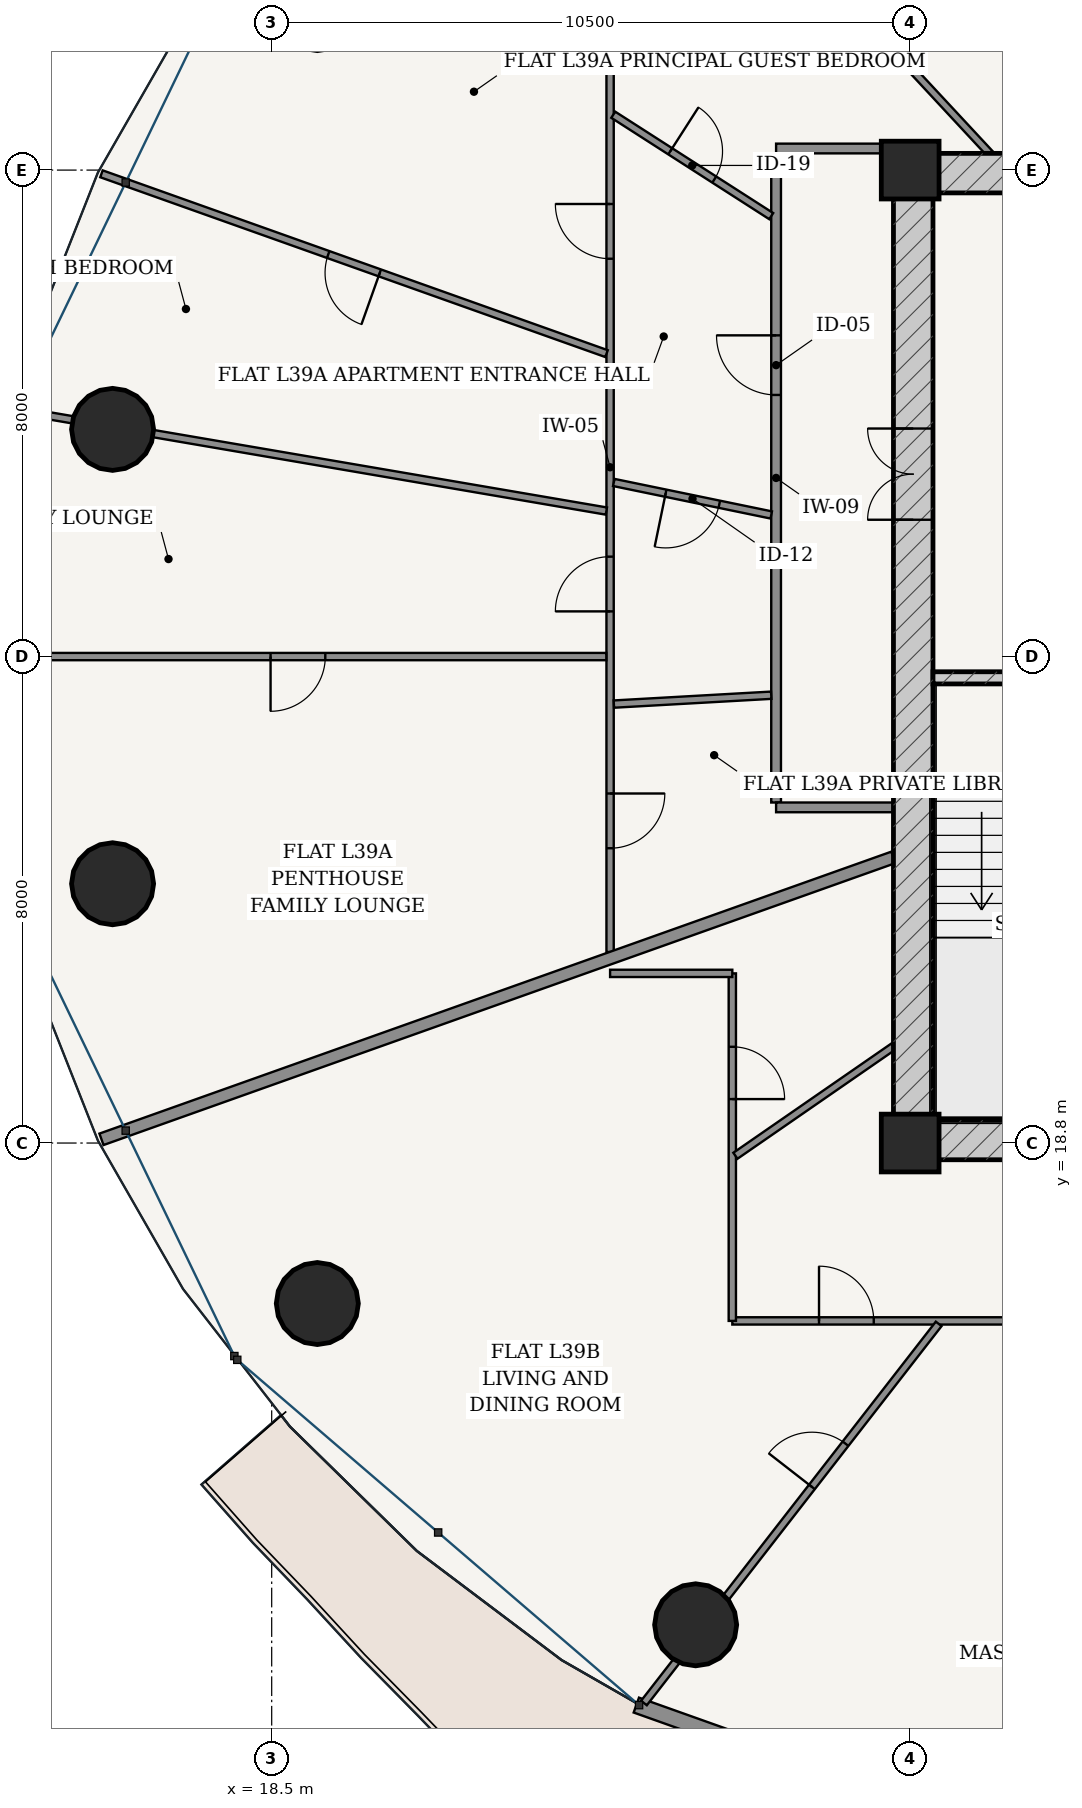
"""IFC4 building model, lengths in metres.
Left out: names, types, materials, properties, quantities, classifications, styles, units other than length and angle.
Written with IfcOpenShell. Run it as: python <this file> out.ifc"""

import sys

from ifc_helpers import new_model, si_unit, direction, frame, frame_2d, origin, origin_2d, place, context, subcontext, project, spatial, rectangle, hollow_circle, extrude, source, transform, mapped, element, fill, save


model = new_model("IFC4")
c1 = context("Model", 3, precision=1e-05, world=origin(), true_north=direction((-0.2419218956, 0.970295726276)))
c2 = subcontext(c1, "Body", "Model", "MODEL_VIEW")
j1 = project(units=[si_unit("LENGTHUNIT", "METRE"), si_unit("PLANEANGLEUNIT", "RADIAN")], contexts=[c1])
p1 = place(None, origin())
s1 = spatial("IfcSite", under=j1, at=p1, CompositionType="ELEMENT")
p2 = place(p1, origin())
s2 = spatial("IfcBuilding", under=s1, at=p2, CompositionType="ELEMENT")
p3 = place(p2, frame((0.0, 0.0, 149.8)))
s3 = spatial("IfcBuildingStorey", under=s2, at=p3, CompositionType="ELEMENT", Elevation=149.8)
for number, where, z_axis, x_axis in (
    (1, (29.0, 18.8, 0.0), (0.0, 0.0, 1.0), (1.0, 0.0, 0.0)),
    (2, (29.0, 34.8, 0.0), (0.0, 0.0, 1.0), (1.0, 0.0, 0.0)),
):
    element("IfcColumn", number, at=place(p3, frame(where, z_axis=z_axis, x_axis=x_axis)), inside=s3, PredefinedType="COLUMN", context=c2, shape_type="SweptSolid", body=[
        extrude(rectangle(XDim=0.95, YDim=0.95, at=origin_2d()), origin(), (0.0, 0.0, 1.0), 3.6),
    ])
p4 = place(p3, frame((28.725, 18.85, 0.0), z_axis=(0.0, 0.0, 1.0), x_axis=(1.0, 0.0, 0.0)))
e3 = element("IfcWall", 3, at=p4, inside=s3, PredefinedType="SHEAR", context=c2, shape_type="SweptSolid", body=[
    extrude(rectangle(XDim=18.55, YDim=0.65, at=frame_2d((9.275, 0.0))), origin(), (0.0, 0.0, 1.0), 3.33),
])
p5 = place(p4, frame((7.51, 0.0, 0.0)))
e4 = element("IfcOpeningElement", 4, at=p5, cuts=e3, PredefinedType="OPENING", context=c2, shape_type="SweptSolid", body=[
    extrude(rectangle(XDim=0.85, YDim=2.1, at=frame_2d((0.425, 1.05))), frame((0.0, 0.335, 0.0), z_axis=(0.0, -1.0, 0.0), x_axis=(1.0, 0.0, 0.0)), (0.0, 0.0, 1.0), 0.67),
])
p6 = place(p4, frame((10.59, 0.0, 0.0)))
e5 = element("IfcOpeningElement", 5, at=p6, cuts=e3, PredefinedType="OPENING", context=c2, shape_type="SweptSolid", body=[
    extrude(rectangle(XDim=0.85, YDim=2.1, at=frame_2d((0.425, 1.05))), frame((0.0, 0.335, 0.0), z_axis=(0.0, -1.0, 0.0), x_axis=(1.0, 0.0, 0.0)), (0.0, 0.0, 1.0), 0.67),
])
p7 = place(p3, frame((28.725, 34.75, 0.0), z_axis=(0.0, 0.0, 1.0), x_axis=(1.0, 0.0, 0.0)))
e6 = element("IfcWall", 6, at=p7, inside=s3, PredefinedType="SHEAR", context=c2, shape_type="SweptSolid", body=[
    extrude(rectangle(XDim=18.55, YDim=0.65, at=frame_2d((9.275, 0.0))), origin(), (0.0, 0.0, 1.0), 3.33),
])
p8 = place(p3, frame((29.05, 19.175, 0.0), z_axis=(0.0, 0.0, 1.0), x_axis=(0.0, 1.0, 0.0)))
e7 = element("IfcWall", 7, at=p8, inside=s3, PredefinedType="SHEAR", context=c2, shape_type="SweptSolid", body=[
    extrude(rectangle(XDim=15.25, YDim=0.65, at=frame_2d((7.625, 0.0))), origin(), (0.0, 0.0, 1.0), 3.33),
])
p9 = place(p8, frame((9.875, 0.0, 0.0)))
e8 = element("IfcOpeningElement", 8, at=p9, cuts=e7, PredefinedType="OPENING", context=c2, shape_type="SweptSolid", body=[
    extrude(rectangle(XDim=1.5, YDim=2.2, at=frame_2d((0.75, 1.1))), frame((0.0, 0.335, 0.0), z_axis=(0.0, -1.0, 0.0), x_axis=(1.0, 0.0, 0.0)), (0.0, 0.0, 1.0), 0.67),
])
p10 = place(p3, frame((29.375, 26.45, 0.0), z_axis=(0.0, 0.0, 1.0), x_axis=(1.0, 0.0, 0.0)))
e9 = element("IfcWall", 9, at=p10, inside=s3, PredefinedType="SOLIDWALL", context=c2, shape_type="SweptSolid", body=[
    extrude(rectangle(XDim=3.32, YDim=0.2, at=frame_2d((1.66, 0.0))), origin(), (0.0, 0.0, 1.0), 3.33),
])
p11 = place(p10, frame((1.185, 0.0, 0.0)))
e10 = element("IfcOpeningElement", 10, at=p11, cuts=e9, PredefinedType="OPENING", context=c2, shape_type="SweptSolid", body=[
    extrude(rectangle(XDim=0.95, YDim=2.15, at=frame_2d((0.475, 1.075))), frame((0.0, 0.11, 0.0), z_axis=(0.0, -1.0, 0.0), x_axis=(1.0, 0.0, 0.0)), (0.0, 0.0, 1.0), 0.22),
])
for number, where, z_axis, x_axis in (
    (11, (15.883, 30.536, 0.0), (0.0, 0.0, 1.0), (1.0, 0.0, 0.0)),
    (12, (15.883, 23.064, 0.0), (0.0, 0.0, 1.0), (1.0, 0.0, 0.0)),
    (13, (19.25, 16.161, 0.0), (0.0, 0.0, 1.0), (1.0, 0.0, 0.0)),
    (14, (25.472, 10.877, 0.0), (0.0, 0.0, 1.0), (1.0, 0.0, 0.0)),
):
    element("IfcColumn", number, at=place(p3, frame(where, z_axis=z_axis, x_axis=x_axis)), inside=s3, PredefinedType="COLUMN", context=c2, shape_type="SweptSolid", body=[
        extrude(hollow_circle(Radius=0.675, WallThickness=0.042, at=origin_2d()), origin(), (0.0, 0.0, 1.0), 3.6),
    ])
p12 = place(p3, frame((24.497, 9.557, 0.0), z_axis=(0.0, 0.0, 1.0), x_axis=(0.942103604331, -0.335321932934, 0.0)))
e15 = element("IfcWall", 15, at=p12, inside=s3, PredefinedType="SOLIDWALL", context=c2, shape_type="SweptSolid", body=[
    extrude(rectangle(XDim=9.408, YDim=0.26, at=frame_2d((4.704, 0.0))), origin(), (0.0, 0.0, 1.0), 3.33),
])
p13 = place(p12, frame((4.029, 0.0, 0.0)))
e16 = element("IfcOpeningElement", 16, at=p13, cuts=e15, PredefinedType="OPENING", context=c2, shape_type="SweptSolid", body=[
    extrude(rectangle(XDim=1.35, YDim=2.2, at=frame_2d((0.675, 1.1))), frame((0.0, 0.14, 0.0), z_axis=(0.0, -1.0, 0.0), x_axis=(1.0, 0.0, 0.0)), (0.0, 0.0, 1.0), 0.28),
])
p14 = place(p3, frame((26.795, 24.4, 0.0), z_axis=(0.0, 0.0, 1.0), x_axis=(0.0, 1.0, 0.0)))
e17 = element("IfcWall", 17, at=p14, inside=s3, PredefinedType="PARTITIONING", context=c2, shape_type="SweptSolid", body=[
    extrude(rectangle(XDim=10.675, YDim=0.16, at=frame_2d((5.337, 0.0))), origin(), (0.0, 0.0, 1.0), 2.776),
])
p15 = place(p14, frame((6.702, 0.0, 0.0)))
e18 = element("IfcOpeningElement", 18, at=p15, cuts=e17, PredefinedType="OPENING", context=c2, shape_type="SweptSolid", body=[
    extrude(rectangle(XDim=0.98, YDim=2.2, at=frame_2d((0.49, 1.1))), frame((0.0, 0.09, 0.0), z_axis=(0.0, -1.0, 0.0), x_axis=(1.0, 0.0, 0.0)), (0.0, 0.0, 1.0), 0.18),
])
p16 = place(p3, frame((26.795, 35.155, 0.0), z_axis=(0.0, 0.0, 1.0), x_axis=(1.0, 0.0, 0.0)))
e19 = element("IfcWall", 19, at=p16, inside=s3, PredefinedType="PARTITIONING", context=c2, shape_type="SweptSolid", body=[
    extrude(rectangle(XDim=1.93, YDim=0.16, at=frame_2d((0.965, 0.0))), origin(), (0.0, 0.0, 1.0), 2.776),
])
p17 = place(p3, frame((26.795, 24.32, 0.0), z_axis=(0.0, 0.0, 1.0), x_axis=(1.0, 0.0, 0.0)))
e20 = element("IfcWall", 20, at=p17, inside=s3, PredefinedType="PARTITIONING", context=c2, shape_type="SweptSolid", body=[
    extrude(rectangle(XDim=1.93, YDim=0.16, at=frame_2d((0.965, 0.0))), origin(), (0.0, 0.0, 1.0), 3.33),
])
p18 = place(p3, frame((24.065, 21.941, 0.0), z_axis=(0.0, 0.0, 1.0), x_axis=(0.0, 1.0, 0.0)))
e21 = element("IfcWall", 21, at=p18, inside=s3, PredefinedType="PARTITIONING", context=c2, shape_type="SweptSolid", body=[
    extrude(rectangle(XDim=15.944, YDim=0.12, at=frame_2d((7.972, 0.0))), origin(), (0.0, 0.0, 1.0), 2.776),
])
p19 = place(p18, frame((5.602, 0.0, 0.0)))
e22 = element("IfcOpeningElement", 22, at=p19, cuts=e21, PredefinedType="OPENING", context=c2, shape_type="SweptSolid", body=[
    extrude(rectangle(XDim=0.9, YDim=2.15, at=frame_2d((0.45, 1.075))), frame((0.0, 0.07, 0.0), z_axis=(0.0, -1.0, 0.0), x_axis=(1.0, 0.0, 0.0)), (0.0, 0.0, 1.0), 0.14),
])
p20 = place(p18, frame((1.707, 0.0, 0.0)))
e23 = element("IfcOpeningElement", 23, at=p20, cuts=e21, PredefinedType="OPENING", context=c2, shape_type="SweptSolid", body=[
    extrude(rectangle(XDim=0.9, YDim=2.15, at=frame_2d((0.45, 1.075))), frame((0.0, 0.07, 0.0), z_axis=(0.0, -1.0, 0.0), x_axis=(1.0, 0.0, 0.0)), (0.0, 0.0, 1.0), 0.14),
])
p21 = place(p18, frame((11.402, 0.0, 0.0)))
e24 = element("IfcOpeningElement", 24, at=p21, cuts=e21, PredefinedType="OPENING", context=c2, shape_type="SweptSolid", body=[
    extrude(rectangle(XDim=0.9, YDim=2.15, at=frame_2d((0.45, 1.075))), frame((0.0, 0.07, 0.0), z_axis=(0.0, -1.0, 0.0), x_axis=(1.0, 0.0, 0.0)), (0.0, 0.0, 1.0), 0.14),
])
p22 = place(p3, frame((24.007, 31.782, 0.0), z_axis=(0.0, 0.0, 1.0), x_axis=(-0.942077868165, 0.335394231187, 0.0)))
e25 = element("IfcWall", 25, at=p22, inside=s3, PredefinedType="PARTITIONING", context=c2, shape_type="SweptSolid", body=[
    extrude(rectangle(XDim=8.817, YDim=0.12, at=frame_2d((4.408, 0.0))), origin(), (0.0, 0.0, 1.0), 2.846),
])
p23 = place(p22, frame((3.958, 0.0, 0.0)))
e26 = element("IfcOpeningElement", 26, at=p23, cuts=e25, PredefinedType="OPENING", context=c2, shape_type="SweptSolid", body=[
    extrude(rectangle(XDim=0.9, YDim=2.15, at=frame_2d((0.45, 1.075))), frame((0.0, 0.07, 0.0), z_axis=(0.0, -1.0, 0.0), x_axis=(1.0, 0.0, 0.0)), (0.0, 0.0, 1.0), 0.14),
])
p24 = place(p3, frame((24.004, 29.193, 0.0), z_axis=(0.0, 0.0, 1.0), x_axis=(-0.985698378271, 0.168519159369, 0.0)))
e27 = element("IfcWall", 27, at=p24, inside=s3, PredefinedType="PARTITIONING", context=c2, shape_type="SweptSolid", body=[
    extrude(rectangle(XDim=9.769, YDim=0.12, at=frame_2d((4.884, 0.0))), origin(), (0.0, 0.0, 1.0), 2.776),
])
p25 = place(p3, frame((24.003, 26.8, 0.0), z_axis=(0.0, 0.0, 1.0), x_axis=(-1.0, 0.0, 0.0)))
e28 = element("IfcWall", 28, at=p25, inside=s3, PredefinedType="PARTITIONING", context=c2, shape_type="SweptSolid", body=[
    extrude(rectangle(XDim=10.143, YDim=0.12, at=frame_2d((5.071, 0.0))), origin(), (0.0, 0.0, 1.0), 2.846),
])
p26 = place(p25, frame((4.622, 0.0, 0.0)))
e29 = element("IfcOpeningElement", 29, at=p26, cuts=e28, PredefinedType="OPENING", context=c2, shape_type="SweptSolid", body=[
    extrude(rectangle(XDim=0.9, YDim=2.15, at=frame_2d((0.45, 1.075))), frame((0.0, 0.07, 0.0), z_axis=(0.0, -1.0, 0.0), x_axis=(1.0, 0.0, 0.0)), (0.0, 0.0, 1.0), 0.14),
])
p27 = place(p3, frame((30.307, 35.075, 0.0), z_axis=(0.0, 0.0, 1.0), x_axis=(-0.68082810609, 0.732443233267, 0.0)))
e30 = element("IfcWall", 30, at=p27, inside=s3, PredefinedType="PARTITIONING", context=c2, shape_type="SweptSolid", body=[
    extrude(rectangle(XDim=3.775, YDim=0.12, at=frame_2d((1.887, 0.0))), origin(), (0.0, 0.0, 1.0), 2.776),
])
p28 = place(p3, frame((26.715, 34.043, 0.0), z_axis=(0.0, 0.0, 1.0), x_axis=(-0.841597086151, 0.540105864235, 0.0)))
e31 = element("IfcWall", 31, at=p28, inside=s3, PredefinedType="PARTITIONING", context=c2, shape_type="SweptSolid", body=[
    extrude(rectangle(XDim=3.087, YDim=0.12, at=frame_2d((1.543, 0.0))), origin(), (0.0, 0.0, 1.0), 3.005),
])
p29 = place(p28, frame((1.113, 0.0, 0.0)))
e32 = element("IfcOpeningElement", 32, at=p29, cuts=e31, PredefinedType="OPENING", context=c2, shape_type="SweptSolid", body=[
    extrude(rectangle(XDim=0.86, YDim=2.15, at=frame_2d((0.43, 1.075))), frame((0.0, 0.07, 0.0), z_axis=(0.0, -1.0, 0.0), x_axis=(1.0, 0.0, 0.0)), (0.0, 0.0, 1.0), 0.14),
])
p30 = place(p3, frame((26.715, 29.129, 0.0), z_axis=(0.0, 0.0, 1.0), x_axis=(-0.979376501526, 0.202043728582, 0.0)))
e33 = element("IfcWall", 33, at=p30, inside=s3, PredefinedType="PARTITIONING", context=c2, shape_type="SweptSolid", body=[
    extrude(rectangle(XDim=2.644, YDim=0.12, at=frame_2d((1.322, 0.0))), origin(), (0.0, 0.0, 1.0), 3.33),
])
p31 = place(p30, frame((0.872, 0.0, 0.0)))
e34 = element("IfcOpeningElement", 34, at=p31, cuts=e33, PredefinedType="OPENING", context=c2, shape_type="SweptSolid", body=[
    extrude(rectangle(XDim=0.9, YDim=2.15, at=frame_2d((0.45, 1.075))), frame((0.0, 0.07, 0.0), z_axis=(0.0, -1.0, 0.0), x_axis=(1.0, 0.0, 0.0)), (0.0, 0.0, 1.0), 0.14),
])
p32 = place(p3, frame((26.715, 26.164, 0.0), z_axis=(0.0, 0.0, 1.0), x_axis=(-0.998418047295, -0.056226353574, 0.0)))
e35 = element("IfcWall", 35, at=p32, inside=s3, PredefinedType="PARTITIONING", context=c2, shape_type="SweptSolid", body=[
    extrude(rectangle(XDim=2.592, YDim=0.12, at=frame_2d((1.296, 0.0))), origin(), (0.0, 0.0, 1.0), 3.33),
])
p33 = place(p3, frame((28.723, 23.497, 0.0), z_axis=(0.0, 0.0, 1.0), x_axis=(-0.942077095572, -0.335396401292, 0.0)))
e36 = element("IfcWall", 36, at=p33, inside=s3, PredefinedType="PARTITIONING", context=c2, shape_type="SweptSolid", body=[
    extrude(rectangle(XDim=13.823, YDim=0.2, at=frame_2d((6.912, 0.0))), origin(), (0.0, 0.0, 1.0), 2.846),
])
p34 = place(p3, frame((31.59, 15.875, 0.0), z_axis=(0.0, 0.0, 1.0), x_axis=(-1.0, 0.0, 0.0)))
e37 = element("IfcWall", 37, at=p34, inside=s3, PredefinedType="PARTITIONING", context=c2, shape_type="SweptSolid", body=[
    extrude(rectangle(XDim=5.515, YDim=0.12, at=frame_2d((2.758, 0.0))), origin(), (0.0, 0.0, 1.0), 2.776),
])
p35 = place(p34, frame((3.189, 0.0, 0.0)))
e38 = element("IfcOpeningElement", 38, at=p35, cuts=e37, PredefinedType="OPENING", context=c2, shape_type="SweptSolid", body=[
    extrude(rectangle(XDim=0.9, YDim=2.15, at=frame_2d((0.45, 1.075))), frame((0.0, 0.07, 0.0), z_axis=(0.0, -1.0, 0.0), x_axis=(1.0, 0.0, 0.0)), (0.0, 0.0, 1.0), 0.14),
])
p36 = place(p3, frame((26.075, 15.875, 0.0), z_axis=(0.0, 0.0, 1.0), x_axis=(0.0, 1.0, 0.0)))
e39 = element("IfcWall", 39, at=p36, inside=s3, PredefinedType="PARTITIONING", context=c2, shape_type="SweptSolid", body=[
    extrude(rectangle(XDim=5.715, YDim=0.12, at=frame_2d((2.857, 0.0))), origin(), (0.0, 0.0, 1.0), 2.776),
])
p37 = place(p36, frame((3.648, 0.0, 0.0)))
e40 = element("IfcOpeningElement", 40, at=p37, cuts=e39, PredefinedType="OPENING", context=c2, shape_type="SweptSolid", body=[
    extrude(rectangle(XDim=0.86, YDim=2.15, at=frame_2d((0.43, 1.075))), frame((0.0, 0.07, 0.0), z_axis=(0.0, -1.0, 0.0), x_axis=(1.0, 0.0, 0.0)), (0.0, 0.0, 1.0), 0.14),
])
p38 = place(p3, frame((26.075, 21.59, 0.0), z_axis=(0.0, 0.0, 1.0), x_axis=(-1.0, 0.0, 0.0)))
e41 = element("IfcWall", 41, at=p38, inside=s3, PredefinedType="PARTITIONING", context=c2, shape_type="SweptSolid", body=[
    extrude(rectangle(XDim=2.01, YDim=0.12, at=frame_2d((1.005, 0.0))), origin(), (0.0, 0.0, 1.0), 3.33),
])
p39 = place(p3, frame((29.469, 15.826, 0.0), z_axis=(0.0, 0.0, 1.0), x_axis=(-0.61373942367, -0.789508657225, 0.0)))
e42 = element("IfcWall", 42, at=p39, inside=s3, PredefinedType="PARTITIONING", context=c2, shape_type="SweptSolid", body=[
    extrude(rectangle(XDim=7.898, YDim=0.12, at=frame_2d((3.949, 0.0))), origin(), (0.0, 0.0, 1.0), 2.776),
])
p40 = place(p39, frame((2.496, 0.0, 0.0)))
e43 = element("IfcOpeningElement", 43, at=p40, cuts=e42, PredefinedType="OPENING", context=c2, shape_type="SweptSolid", body=[
    extrude(rectangle(XDim=0.9, YDim=2.15, at=frame_2d((0.45, 1.075))), frame((0.0, 0.07, 0.0), z_axis=(0.0, -1.0, 0.0), x_axis=(1.0, 0.0, 0.0)), (0.0, 0.0, 1.0), 0.14),
])
p41 = place(p3, frame((28.723, 20.386, 0.0), z_axis=(0.0, 0.0, 1.0), x_axis=(-0.822570551556, -0.568663070467, 0.0)))
e44 = element("IfcWall", 44, at=p41, inside=s3, PredefinedType="PARTITIONING", context=c2, shape_type="SweptSolid", body=[
    extrude(rectangle(XDim=3.158, YDim=0.12, at=frame_2d((1.579, 0.0))), origin(), (0.0, 0.0, 1.0), 3.33),
])
m1 = source(origin(), c2, "Body", "SweptSolid", [
    extrude(rectangle(XDim=1.5, YDim=2.2, at=frame_2d((0.75, 1.1))), frame((0.0, 0.025, 0.0), z_axis=(0.0, -1.0, 0.0), x_axis=(1.0, 0.0, 0.0)), (0.0, 0.0, 1.0), 0.05),
])
p42 = place(p9, origin())
e45 = element("IfcDoor", 45, at=p42, inside=s3, OperationType="DOUBLE_DOOR_SINGLE_SWING", PredefinedType="DOOR", context=c2, shape_type="MappedRepresentation", body=[
    mapped(m1, transform((0.0, 0.0, 0.0), scale=1.0)),
])
fill(e8, e45)
m2 = source(origin(), c2, "Body", "SweptSolid", [
    extrude(rectangle(XDim=0.98, YDim=2.2, at=frame_2d((0.49, 1.1))), frame((0.0, 0.025, 0.0), z_axis=(0.0, -1.0, 0.0), x_axis=(1.0, 0.0, 0.0)), (0.0, 0.0, 1.0), 0.05),
])
p43 = place(p15, origin())
e46 = element("IfcDoor", 46, at=p43, inside=s3, OperationType="SINGLE_SWING_RIGHT", PredefinedType="DOOR", context=c2, shape_type="MappedRepresentation", body=[
    mapped(m2, transform((0.0, 0.0, 0.0), scale=1.0)),
])
fill(e18, e46)
m3 = source(origin(), c2, "Body", "SweptSolid", [
    extrude(rectangle(XDim=0.86, YDim=2.15, at=frame_2d((0.43, 1.075))), frame((0.0, 0.025, 0.0), z_axis=(0.0, -1.0, 0.0), x_axis=(1.0, 0.0, 0.0)), (0.0, 0.0, 1.0), 0.05),
])
p44 = place(p29, frame((0.86, 0.0, 0.0), z_axis=(0.0, 0.0, 1.0), x_axis=(-1.0, 0.0, 0.0)))
e47 = element("IfcDoor", 47, at=p44, inside=s3, OperationType="SINGLE_SWING_LEFT", PredefinedType="DOOR", context=c2, shape_type="MappedRepresentation", body=[
    mapped(m3, transform((0.0, 0.0, 0.0), scale=1.0)),
])
fill(e32, e47)
m4 = source(origin(), c2, "Body", "SweptSolid", [
    extrude(rectangle(XDim=0.9, YDim=2.15, at=frame_2d((0.45, 1.075))), frame((0.0, 0.025, 0.0), z_axis=(0.0, -1.0, 0.0), x_axis=(1.0, 0.0, 0.0)), (0.0, 0.0, 1.0), 0.05),
])
p45 = place(p31, origin())
e48 = element("IfcDoor", 48, at=p45, inside=s3, OperationType="SINGLE_SWING_RIGHT", PredefinedType="DOOR", context=c2, shape_type="MappedRepresentation", body=[
    mapped(m4, transform((0.0, 0.0, 0.0), scale=1.0)),
])
fill(e34, e48)
p46 = place(p19, origin())
e49 = element("IfcDoor", 49, at=p46, inside=s3, OperationType="SINGLE_SWING_LEFT", PredefinedType="DOOR", context=c2, shape_type="MappedRepresentation", body=[
    mapped(m4, transform((0.0, 0.0, 0.0), scale=1.0)),
])
fill(e22, e49)
p47 = place(p26, origin())
e50 = element("IfcDoor", 50, at=p47, inside=s3, OperationType="SINGLE_SWING_RIGHT", PredefinedType="DOOR", context=c2, shape_type="MappedRepresentation", body=[
    mapped(m4, transform((0.0, 0.0, 0.0), scale=1.0)),
])
fill(e29, e50)
p48 = place(p20, frame((0.9, 0.0, 0.0), z_axis=(0.0, 0.0, 1.0), x_axis=(-1.0, 0.0, 0.0)))
e51 = element("IfcDoor", 51, at=p48, inside=s3, OperationType="SINGLE_SWING_LEFT", PredefinedType="DOOR", context=c2, shape_type="MappedRepresentation", body=[
    mapped(m4, transform((0.0, 0.0, 0.0), scale=1.0)),
])
fill(e23, e51)
p49 = place(p21, origin())
e52 = element("IfcDoor", 52, at=p49, inside=s3, OperationType="SINGLE_SWING_RIGHT", PredefinedType="DOOR", context=c2, shape_type="MappedRepresentation", body=[
    mapped(m4, transform((0.0, 0.0, 0.0), scale=1.0)),
])
fill(e24, e52)
p50 = place(p23, origin())
e53 = element("IfcDoor", 53, at=p50, inside=s3, OperationType="SINGLE_SWING_LEFT", PredefinedType="DOOR", context=c2, shape_type="MappedRepresentation", body=[
    mapped(m4, transform((0.0, 0.0, 0.0), scale=1.0)),
])
fill(e26, e53)
p51 = place(p40, frame((0.9, 0.0, 0.0), z_axis=(0.0, 0.0, 1.0), x_axis=(-1.0, 0.0, 0.0)))
e54 = element("IfcDoor", 54, at=p51, inside=s3, OperationType="SINGLE_SWING_LEFT", PredefinedType="DOOR", context=c2, shape_type="MappedRepresentation", body=[
    mapped(m4, transform((0.0, 0.0, 0.0), scale=1.0)),
])
fill(e43, e54)
p52 = place(p37, frame((0.86, 0.0, 0.0), z_axis=(0.0, 0.0, 1.0), x_axis=(-1.0, 0.0, 0.0)))
e55 = element("IfcDoor", 55, at=p52, inside=s3, OperationType="SINGLE_SWING_RIGHT", PredefinedType="DOOR", context=c2, shape_type="MappedRepresentation", body=[
    mapped(m3, transform((0.0, 0.0, 0.0), scale=1.0)),
])
fill(e40, e55)
p53 = place(p35, frame((0.9, 0.0, 0.0), z_axis=(0.0, 0.0, 1.0), x_axis=(-1.0, 0.0, 0.0)))
e56 = element("IfcDoor", 56, at=p53, inside=s3, OperationType="SINGLE_SWING_LEFT", PredefinedType="DOOR", context=c2, shape_type="MappedRepresentation", body=[
    mapped(m4, transform((0.0, 0.0, 0.0), scale=1.0)),
])
fill(e38, e56)
save(model, sys.argv[1])
